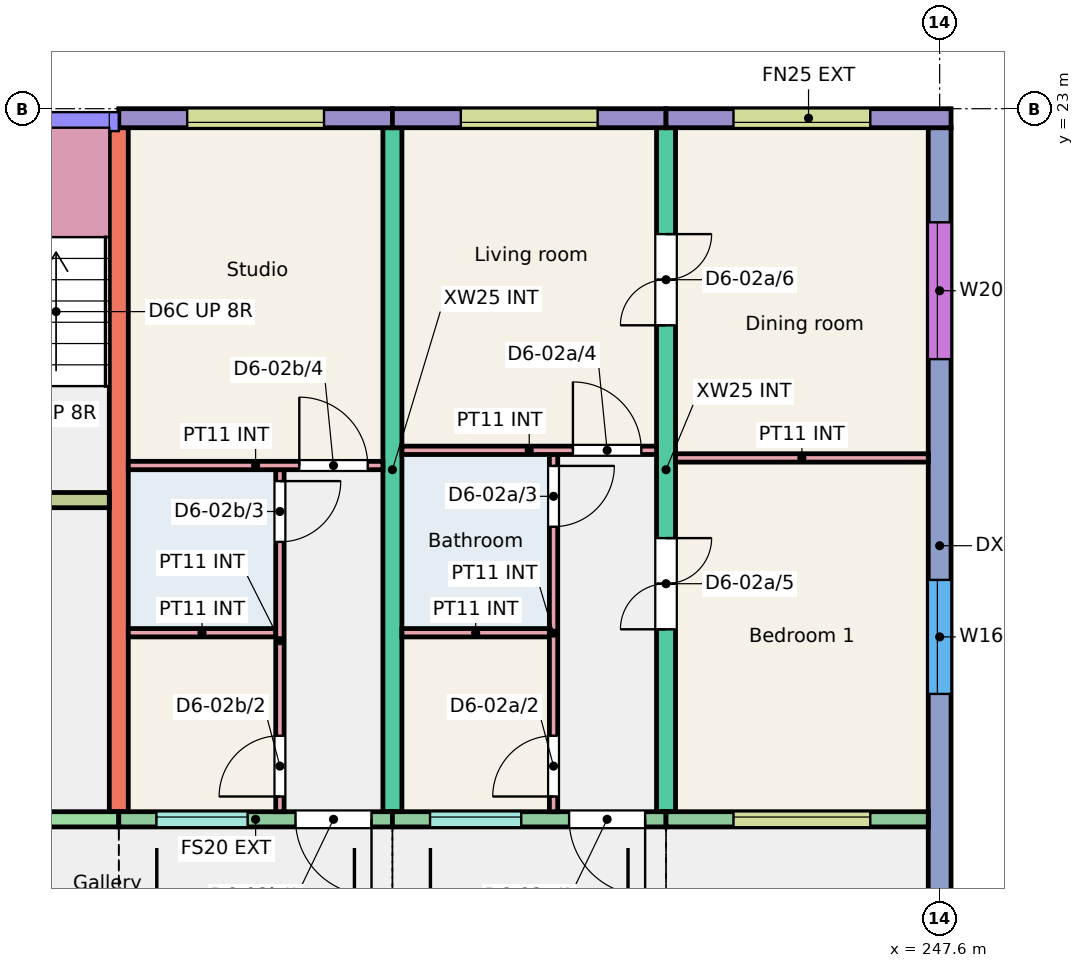
"""IFC4 building model, lengths in metres.
Left out: names, types, materials, properties, quantities, classifications, styles, units other than length and angle.
Written with IfcOpenShell. Run it as: python <this file> out.ifc"""

import sys

from ifc_helpers import new_model, si_unit, direction, frame, frame_2d, origin, place, context, subcontext, project, spatial, rectangle, extrude, element, fill, save


model = new_model("IFC4")
c1 = context("Model", 3, precision=1e-05, world=origin(), true_north=direction((0.0, 1.0)))
c2 = subcontext(c1, "Body", "Model", "MODEL_VIEW")
j1 = project(units=[si_unit("LENGTHUNIT", "METRE"), si_unit("PLANEANGLEUNIT", "RADIAN")], contexts=[c1])
p1 = place(None, origin())
s1 = spatial("IfcSite", under=j1, at=p1, CompositionType="ELEMENT")
p2 = place(p1, origin())
s2 = spatial("IfcBuilding", under=s1, at=p2, CompositionType="ELEMENT")
p3 = place(p2, frame((0.0, 0.0, 6.0)))
s3 = spatial("IfcBuildingStorey", under=s2, at=p3, CompositionType="ELEMENT", Elevation=6.0)
for number, where, z_axis, x_axis in (
    (1, (236.8, 13.75, 0.0), (0.0, 0.0, 1.0), (0.0, 1.0, 0.0)),
    (2, (240.4, 13.75, 0.0), (0.0, 0.0, 1.0), (0.0, 1.0, 0.0)),
):
    element("IfcWall", number, at=place(p3, frame(where, z_axis=z_axis, x_axis=x_axis)), inside=s3, PredefinedType="SHEAR", context=c2, shape_type="SweptSolid", body=[
        extrude(rectangle(XDim=9.0, YDim=0.25, at=frame_2d((4.5, 0.0))), origin(), (0.0, 0.0, 1.0), 3.0),
    ])
p4 = place(p3, frame((244.0, 13.75, 0.0), z_axis=(0.0, 0.0, 1.0), x_axis=(0.0, 1.0, 0.0)))
e3 = element("IfcWall", 3, at=p4, inside=s3, PredefinedType="SHEAR", context=c2, shape_type="SweptSolid", body=[
    extrude(rectangle(XDim=9.0, YDim=0.25, at=frame_2d((4.5, 0.0))), origin(), (0.0, 0.0, 1.0), 3.0),
])
p5 = place(p4, frame((2.4, 0.0, 0.0)))
e4 = element("IfcOpeningElement", 4, at=p5, cuts=e3, PredefinedType="OPENING", context=c2, shape_type="SweptSolid", body=[
    extrude(rectangle(XDim=1.2, YDim=2.1, at=frame_2d((0.6, 1.05))), frame((0.0, 0.135, 0.0), z_axis=(0.0, -1.0, 0.0), x_axis=(1.0, 0.0, 0.0)), (0.0, 0.0, 1.0), 0.27),
])
p6 = place(p4, frame((6.4, 0.0, 0.0)))
e5 = element("IfcOpeningElement", 5, at=p6, cuts=e3, PredefinedType="OPENING", context=c2, shape_type="SweptSolid", body=[
    extrude(rectangle(XDim=1.2, YDim=2.1, at=frame_2d((0.6, 1.05))), frame((0.0, 0.135, 0.0), z_axis=(0.0, -1.0, 0.0), x_axis=(1.0, 0.0, 0.0)), (0.0, 0.0, 1.0), 0.27),
])
p7 = place(p3, frame((247.6, 11.75, 0.0), z_axis=(0.0, 0.0, 1.0), x_axis=(0.0, 1.0, 0.0)))
e6 = element("IfcWall", 6, at=p7, inside=s3, PredefinedType="SHEAR", context=c2, shape_type="SweptSolid", body=[
    extrude(rectangle(XDim=11.0, YDim=0.3, at=frame_2d((5.5, 0.0))), origin(), (0.0, 0.0, 1.0), 3.0),
])
p8 = place(p7, frame((3.55, 0.0, 0.9)))
e7 = element("IfcOpeningElement", 7, at=p8, cuts=e6, PredefinedType="OPENING", context=c2, shape_type="SweptSolid", body=[
    extrude(rectangle(XDim=1.5, YDim=1.5, at=frame_2d((0.75, 0.75))), frame((0.0, 0.16, 0.0), z_axis=(0.0, -1.0, 0.0), x_axis=(1.0, 0.0, 0.0)), (0.0, 0.0, 1.0), 0.32),
])
p9 = place(p7, frame((7.955, 0.0, 0.9)))
e8 = element("IfcOpeningElement", 8, at=p9, cuts=e6, PredefinedType="OPENING", context=c2, shape_type="SweptSolid", body=[
    extrude(rectangle(XDim=1.8, YDim=1.5, at=frame_2d((0.9, 0.75))), frame((0.0, 0.16, 0.0), z_axis=(0.0, -1.0, 0.0), x_axis=(1.0, 0.0, 0.0)), (0.0, 0.0, 1.0), 0.32),
])
p10 = place(p3, frame((230.95, 13.65, 0.0), z_axis=(0.0, 0.0, 1.0), x_axis=(1.0, 0.0, 0.0)))
e9 = element("IfcWall", 9, at=p10, inside=s3, PredefinedType="SHEAR", context=c2, shape_type="SweptSolid", body=[
    extrude(rectangle(XDim=5.85, YDim=0.2, at=frame_2d((2.925, 0.0))), origin(), (0.0, 0.0, 1.0), 3.0),
])
p11 = place(p10, frame((2.312, 0.0, 0.0)))
e10 = element("IfcOpeningElement", 10, at=p11, cuts=e9, PredefinedType="OPENING", context=c2, shape_type="SweptSolid", body=[
    extrude(rectangle(XDim=1.1, YDim=2.1, at=frame_2d((0.55, 1.05))), frame((0.0, 0.11, 0.0), z_axis=(0.0, -1.0, 0.0), x_axis=(1.0, 0.0, 0.0)), (0.0, 0.0, 1.0), 0.22),
])
p12 = place(p3, frame((230.95, 17.85, 0.0), z_axis=(0.0, 0.0, 1.0), x_axis=(1.0, 0.0, 0.0)))
e11 = element("IfcWall", 11, at=p12, inside=s3, PredefinedType="SHEAR", context=c2, shape_type="SweptSolid", body=[
    extrude(rectangle(XDim=5.725, YDim=0.2, at=frame_2d((2.863, 0.0))), origin(), (0.0, 0.0, 1.0), 3.0),
])
p13 = place(p12, frame((3.775, 0.0, 0.0)))
e12 = element("IfcOpeningElement", 12, at=p13, cuts=e11, PredefinedType="OPENING", context=c2, shape_type="SweptSolid", body=[
    extrude(rectangle(XDim=1.0, YDim=2.1, at=frame_2d((0.5, 1.05))), frame((0.0, 0.11, 0.0), z_axis=(0.0, -1.0, 0.0), x_axis=(1.0, 0.0, 0.0)), (0.0, 0.0, 1.0), 0.22),
])
p14 = place(p12, frame((0.762, 0.0, 0.0)))
e13 = element("IfcOpeningElement", 13, at=p14, cuts=e11, PredefinedType="OPENING", context=c2, shape_type="SweptSolid", body=[
    extrude(rectangle(XDim=1.1, YDim=2.1, at=frame_2d((0.55, 1.05))), frame((0.0, 0.11, 0.0), z_axis=(0.0, -1.0, 0.0), x_axis=(1.0, 0.0, 0.0)), (0.0, 0.0, 1.0), 0.22),
])
p15 = place(p3, frame((236.8, 22.875, 0.0), z_axis=(0.0, 0.0, 1.0), x_axis=(1.0, 0.0, 0.0)))
e14 = element("IfcWall", 14, at=p15, inside=s3, PredefinedType="SOLIDWALL", context=c2, shape_type="SweptSolid", body=[
    extrude(rectangle(XDim=3.6, YDim=0.25, at=frame_2d((1.8, 0.0))), origin(), (0.0, 0.0, 1.0), 3.0),
])
p16 = place(p15, frame((0.9, 0.0, 1.1)))
e15 = element("IfcOpeningElement", 15, at=p16, cuts=e14, PredefinedType="OPENING", context=c2, shape_type="SweptSolid", body=[
    extrude(rectangle(XDim=1.8, YDim=1.3, at=frame_2d((0.9, 0.65))), frame((0.0, 0.135, 0.0), z_axis=(0.0, -1.0, 0.0), x_axis=(1.0, 0.0, 0.0)), (0.0, 0.0, 1.0), 0.27),
])
p17 = place(p3, frame((236.8, 13.65, 0.0), z_axis=(0.0, 0.0, 1.0), x_axis=(1.0, 0.0, 0.0)))
e16 = element("IfcWall", 16, at=p17, inside=s3, PredefinedType="SOLIDWALL", context=c2, shape_type="SweptSolid", body=[
    extrude(rectangle(XDim=3.6, YDim=0.2, at=frame_2d((1.8, 0.0))), origin(), (0.0, 0.0, 1.0), 3.0),
])
p18 = place(p17, frame((0.495, 0.0, 1.1)))
e17 = element("IfcOpeningElement", 17, at=p18, cuts=e16, PredefinedType="OPENING", context=c2, shape_type="SweptSolid", body=[
    extrude(rectangle(XDim=1.2, YDim=1.3, at=frame_2d((0.6, 0.65))), frame((0.0, 0.11, 0.0), z_axis=(0.0, -1.0, 0.0), x_axis=(1.0, 0.0, 0.0)), (0.0, 0.0, 1.0), 0.22),
])
p19 = place(p17, frame((2.325, 0.0, 0.0)))
e18 = element("IfcOpeningElement", 18, at=p19, cuts=e16, PredefinedType="OPENING", context=c2, shape_type="SweptSolid", body=[
    extrude(rectangle(XDim=1.0, YDim=2.1, at=frame_2d((0.5, 1.05))), frame((0.0, 0.11, 0.0), z_axis=(0.0, -1.0, 0.0), x_axis=(1.0, 0.0, 0.0)), (0.0, 0.0, 1.0), 0.22),
])
p20 = place(p3, frame((240.4, 22.875, 0.0), z_axis=(0.0, 0.0, 1.0), x_axis=(1.0, 0.0, 0.0)))
e19 = element("IfcWall", 19, at=p20, inside=s3, PredefinedType="SOLIDWALL", context=c2, shape_type="SweptSolid", body=[
    extrude(rectangle(XDim=3.6, YDim=0.25, at=frame_2d((1.8, 0.0))), origin(), (0.0, 0.0, 1.0), 3.0),
])
p21 = place(p20, frame((0.9, 0.0, 1.1)))
e20 = element("IfcOpeningElement", 20, at=p21, cuts=e19, PredefinedType="OPENING", context=c2, shape_type="SweptSolid", body=[
    extrude(rectangle(XDim=1.8, YDim=1.3, at=frame_2d((0.9, 0.65))), frame((0.0, 0.135, 0.0), z_axis=(0.0, -1.0, 0.0), x_axis=(1.0, 0.0, 0.0)), (0.0, 0.0, 1.0), 0.27),
])
p22 = place(p3, frame((240.4, 13.65, 0.0), z_axis=(0.0, 0.0, 1.0), x_axis=(1.0, 0.0, 0.0)))
e21 = element("IfcWall", 21, at=p22, inside=s3, PredefinedType="SOLIDWALL", context=c2, shape_type="SweptSolid", body=[
    extrude(rectangle(XDim=3.6, YDim=0.2, at=frame_2d((1.8, 0.0))), origin(), (0.0, 0.0, 1.0), 3.0),
])
p23 = place(p22, frame((0.495, 0.0, 1.1)))
e22 = element("IfcOpeningElement", 22, at=p23, cuts=e21, PredefinedType="OPENING", context=c2, shape_type="SweptSolid", body=[
    extrude(rectangle(XDim=1.2, YDim=1.3, at=frame_2d((0.6, 0.65))), frame((0.0, 0.11, 0.0), z_axis=(0.0, -1.0, 0.0), x_axis=(1.0, 0.0, 0.0)), (0.0, 0.0, 1.0), 0.22),
])
p24 = place(p22, frame((2.325, 0.0, 0.0)))
e23 = element("IfcOpeningElement", 23, at=p24, cuts=e21, PredefinedType="OPENING", context=c2, shape_type="SweptSolid", body=[
    extrude(rectangle(XDim=1.0, YDim=2.1, at=frame_2d((0.5, 1.05))), frame((0.0, 0.11, 0.0), z_axis=(0.0, -1.0, 0.0), x_axis=(1.0, 0.0, 0.0)), (0.0, 0.0, 1.0), 0.22),
])
p25 = place(p3, frame((244.0, 22.875, 0.0), z_axis=(0.0, 0.0, 1.0), x_axis=(1.0, 0.0, 0.0)))
e24 = element("IfcWall", 24, at=p25, inside=s3, PredefinedType="SOLIDWALL", context=c2, shape_type="SweptSolid", body=[
    extrude(rectangle(XDim=3.75, YDim=0.25, at=frame_2d((1.875, 0.0))), origin(), (0.0, 0.0, 1.0), 3.0),
])
p26 = place(p25, frame((0.887, 0.0, 1.1)))
e25 = element("IfcOpeningElement", 25, at=p26, cuts=e24, PredefinedType="OPENING", context=c2, shape_type="SweptSolid", body=[
    extrude(rectangle(XDim=1.8, YDim=1.3, at=frame_2d((0.9, 0.65))), frame((0.0, 0.135, 0.0), z_axis=(0.0, -1.0, 0.0), x_axis=(1.0, 0.0, 0.0)), (0.0, 0.0, 1.0), 0.27),
])
p27 = place(p3, frame((244.0, 13.65, 0.0), z_axis=(0.0, 0.0, 1.0), x_axis=(1.0, 0.0, 0.0)))
e26 = element("IfcWall", 26, at=p27, inside=s3, PredefinedType="SOLIDWALL", context=c2, shape_type="SweptSolid", body=[
    extrude(rectangle(XDim=3.45, YDim=0.2, at=frame_2d((1.725, 0.0))), origin(), (0.0, 0.0, 1.0), 3.0),
])
p28 = place(p27, frame((0.887, 0.0, 1.1)))
e27 = element("IfcOpeningElement", 27, at=p28, cuts=e26, PredefinedType="OPENING", context=c2, shape_type="SweptSolid", body=[
    extrude(rectangle(XDim=1.8, YDim=1.3, at=frame_2d((0.9, 0.65))), frame((0.0, 0.11, 0.0), z_axis=(0.0, -1.0, 0.0), x_axis=(1.0, 0.0, 0.0)), (0.0, 0.0, 1.0), 0.22),
])
p29 = place(p3, frame((240.525, 16.105, 0.0), z_axis=(0.0, 0.0, 1.0), x_axis=(1.0, 0.0, 0.0)))
e28 = element("IfcWall", 28, at=p29, inside=s3, PredefinedType="PARTITIONING", context=c2, shape_type="SweptSolid", body=[
    extrude(rectangle(XDim=1.94, YDim=0.11, at=frame_2d((0.97, 0.0))), origin(), (0.0, 0.0, 1.0), 2.8),
])
p30 = place(p3, frame((242.52, 13.75, 0.0), z_axis=(0.0, 0.0, 1.0), x_axis=(0.0, 1.0, 0.0)))
e29 = element("IfcWall", 29, at=p30, inside=s3, PredefinedType="PARTITIONING", context=c2, shape_type="SweptSolid", body=[
    extrude(rectangle(XDim=4.7, YDim=0.11, at=frame_2d((2.35, 0.0))), origin(), (0.0, 0.0, 1.0), 2.8),
])
p31 = place(p30, frame((0.2, 0.0, 0.0)))
e30 = element("IfcOpeningElement", 30, at=p31, cuts=e29, PredefinedType="OPENING", context=c2, shape_type="SweptSolid", body=[
    extrude(rectangle(XDim=0.8, YDim=2.1, at=frame_2d((0.4, 1.05))), frame((0.0, 0.065, 0.0), z_axis=(0.0, -1.0, 0.0), x_axis=(1.0, 0.0, 0.0)), (0.0, 0.0, 1.0), 0.13),
])
p32 = place(p30, frame((3.75, 0.0, 0.0)))
e31 = element("IfcOpeningElement", 31, at=p32, cuts=e29, PredefinedType="OPENING", context=c2, shape_type="SweptSolid", body=[
    extrude(rectangle(XDim=0.8, YDim=2.1, at=frame_2d((0.4, 1.05))), frame((0.0, 0.065, 0.0), z_axis=(0.0, -1.0, 0.0), x_axis=(1.0, 0.0, 0.0)), (0.0, 0.0, 1.0), 0.13),
])
p33 = place(p3, frame((240.525, 18.505, 0.0), z_axis=(0.0, 0.0, 1.0), x_axis=(1.0, 0.0, 0.0)))
e32 = element("IfcWall", 32, at=p33, inside=s3, PredefinedType="PARTITIONING", context=c2, shape_type="SweptSolid", body=[
    extrude(rectangle(XDim=3.35, YDim=0.11, at=frame_2d((1.675, 0.0))), origin(), (0.0, 0.0, 1.0), 2.8),
])
p34 = place(p33, frame((2.25, 0.0, 0.0)))
e33 = element("IfcOpeningElement", 33, at=p34, cuts=e32, PredefinedType="OPENING", context=c2, shape_type="SweptSolid", body=[
    extrude(rectangle(XDim=0.9, YDim=2.1, at=frame_2d((0.45, 1.05))), frame((0.0, 0.065, 0.0), z_axis=(0.0, -1.0, 0.0), x_axis=(1.0, 0.0, 0.0)), (0.0, 0.0, 1.0), 0.13),
])
p35 = place(p3, frame((244.125, 18.405, 0.0), z_axis=(0.0, 0.0, 1.0), x_axis=(1.0, 0.0, 0.0)))
e34 = element("IfcWall", 34, at=p35, inside=s3, PredefinedType="PARTITIONING", context=c2, shape_type="SweptSolid", body=[
    extrude(rectangle(XDim=3.325, YDim=0.11, at=frame_2d((1.663, 0.0))), origin(), (0.0, 0.0, 1.0), 2.8),
])
p36 = place(p3, frame((236.925, 16.105, 0.0), z_axis=(0.0, 0.0, 1.0), x_axis=(1.0, 0.0, 0.0)))
e35 = element("IfcWall", 35, at=p36, inside=s3, PredefinedType="PARTITIONING", context=c2, shape_type="SweptSolid", body=[
    extrude(rectangle(XDim=1.94, YDim=0.11, at=frame_2d((0.97, 0.0))), origin(), (0.0, 0.0, 1.0), 2.8),
])
p37 = place(p3, frame((238.92, 13.75, 0.0), z_axis=(0.0, 0.0, 1.0), x_axis=(0.0, 1.0, 0.0)))
e36 = element("IfcWall", 36, at=p37, inside=s3, PredefinedType="PARTITIONING", context=c2, shape_type="SweptSolid", body=[
    extrude(rectangle(XDim=4.5, YDim=0.11, at=frame_2d((2.25, 0.0))), origin(), (0.0, 0.0, 1.0), 2.8),
])
p38 = place(p37, frame((0.2, 0.0, 0.0)))
e37 = element("IfcOpeningElement", 37, at=p38, cuts=e36, PredefinedType="OPENING", context=c2, shape_type="SweptSolid", body=[
    extrude(rectangle(XDim=0.8, YDim=2.1, at=frame_2d((0.4, 1.05))), frame((0.0, 0.065, 0.0), z_axis=(0.0, -1.0, 0.0), x_axis=(1.0, 0.0, 0.0)), (0.0, 0.0, 1.0), 0.13),
])
p39 = place(p37, frame((3.55, 0.0, 0.0)))
e38 = element("IfcOpeningElement", 38, at=p39, cuts=e36, PredefinedType="OPENING", context=c2, shape_type="SweptSolid", body=[
    extrude(rectangle(XDim=0.8, YDim=2.1, at=frame_2d((0.4, 1.05))), frame((0.0, 0.065, 0.0), z_axis=(0.0, -1.0, 0.0), x_axis=(1.0, 0.0, 0.0)), (0.0, 0.0, 1.0), 0.13),
])
p40 = place(p3, frame((236.925, 18.305, 0.0), z_axis=(0.0, 0.0, 1.0), x_axis=(1.0, 0.0, 0.0)))
e39 = element("IfcWall", 39, at=p40, inside=s3, PredefinedType="PARTITIONING", context=c2, shape_type="SweptSolid", body=[
    extrude(rectangle(XDim=3.35, YDim=0.11, at=frame_2d((1.675, 0.0))), origin(), (0.0, 0.0, 1.0), 2.8),
])
p41 = place(p40, frame((2.25, 0.0, 0.0)))
e40 = element("IfcOpeningElement", 40, at=p41, cuts=e39, PredefinedType="OPENING", context=c2, shape_type="SweptSolid", body=[
    extrude(rectangle(XDim=0.9, YDim=2.1, at=frame_2d((0.45, 1.05))), frame((0.0, 0.065, 0.0), z_axis=(0.0, -1.0, 0.0), x_axis=(1.0, 0.0, 0.0)), (0.0, 0.0, 1.0), 0.13),
])
p42 = place(p28, origin())
e41 = element("IfcWindow", 41, at=p42, inside=s3, PartitioningType="SINGLE_PANEL", PredefinedType="WINDOW", context=c2, shape_type="SweptSolid", body=[
    extrude(rectangle(XDim=1.8, YDim=1.3, at=frame_2d((0.9, 0.65))), frame((0.0, 0.06, 0.0), z_axis=(0.0, -1.0, 0.0), x_axis=(1.0, 0.0, 0.0)), (0.0, 0.0, 1.0), 0.06),
])
fill(e27, e41)
p43 = place(p26, origin())
e42 = element("IfcWindow", 42, at=p43, inside=s3, PartitioningType="SINGLE_PANEL", PredefinedType="WINDOW", context=c2, shape_type="SweptSolid", body=[
    extrude(rectangle(XDim=1.8, YDim=1.3, at=frame_2d((0.9, 0.65))), frame((0.0, -0.025, 0.0), z_axis=(0.0, -1.0, 0.0), x_axis=(1.0, 0.0, 0.0)), (0.0, 0.0, 1.0), 0.06),
])
fill(e25, e42)
p44 = place(p23, origin())
e43 = element("IfcWindow", 43, at=p44, inside=s3, PartitioningType="SINGLE_PANEL", PredefinedType="WINDOW", context=c2, shape_type="SweptSolid", body=[
    extrude(rectangle(XDim=1.2, YDim=1.3, at=frame_2d((0.6, 0.65))), frame((0.0, 0.06, 0.0), z_axis=(0.0, -1.0, 0.0), x_axis=(1.0, 0.0, 0.0)), (0.0, 0.0, 1.0), 0.06),
])
fill(e22, e43)
p45 = place(p21, origin())
e44 = element("IfcWindow", 44, at=p45, inside=s3, PartitioningType="SINGLE_PANEL", PredefinedType="WINDOW", context=c2, shape_type="SweptSolid", body=[
    extrude(rectangle(XDim=1.8, YDim=1.3, at=frame_2d((0.9, 0.65))), frame((0.0, -0.025, 0.0), z_axis=(0.0, -1.0, 0.0), x_axis=(1.0, 0.0, 0.0)), (0.0, 0.0, 1.0), 0.06),
])
fill(e20, e44)
p46 = place(p8, origin())
e45 = element("IfcWindow", 45, at=p46, inside=s3, PartitioningType="SINGLE_PANEL", PredefinedType="WINDOW", context=c2, shape_type="SweptSolid", body=[
    extrude(rectangle(XDim=1.5, YDim=1.5, at=frame_2d((0.75, 0.75))), frame((0.0, 0.06, 0.0), z_axis=(0.0, -1.0, 0.0), x_axis=(1.0, 0.0, 0.0)), (0.0, 0.0, 1.0), 0.06),
])
fill(e7, e45)
p47 = place(p9, origin())
e46 = element("IfcWindow", 46, at=p47, inside=s3, PartitioningType="SINGLE_PANEL", PredefinedType="WINDOW", context=c2, shape_type="SweptSolid", body=[
    extrude(rectangle(XDim=1.8, YDim=1.5, at=frame_2d((0.9, 0.75))), frame((0.0, 0.06, 0.0), z_axis=(0.0, -1.0, 0.0), x_axis=(1.0, 0.0, 0.0)), (0.0, 0.0, 1.0), 0.06),
])
fill(e8, e46)
p48 = place(p18, origin())
e47 = element("IfcWindow", 47, at=p48, inside=s3, PartitioningType="SINGLE_PANEL", PredefinedType="WINDOW", context=c2, shape_type="SweptSolid", body=[
    extrude(rectangle(XDim=1.2, YDim=1.3, at=frame_2d((0.6, 0.65))), frame((0.0, 0.06, 0.0), z_axis=(0.0, -1.0, 0.0), x_axis=(1.0, 0.0, 0.0)), (0.0, 0.0, 1.0), 0.06),
])
fill(e17, e47)
p49 = place(p16, origin())
e48 = element("IfcWindow", 48, at=p49, inside=s3, PartitioningType="SINGLE_PANEL", PredefinedType="WINDOW", context=c2, shape_type="SweptSolid", body=[
    extrude(rectangle(XDim=1.8, YDim=1.3, at=frame_2d((0.9, 0.65))), frame((0.0, -0.025, 0.0), z_axis=(0.0, -1.0, 0.0), x_axis=(1.0, 0.0, 0.0)), (0.0, 0.0, 1.0), 0.06),
])
fill(e15, e48)
p50 = place(p24, origin())
e49 = element("IfcDoor", 49, at=p50, inside=s3, OperationType="SINGLE_SWING_RIGHT", PredefinedType="DOOR", context=c2, shape_type="SweptSolid", body=[
    extrude(rectangle(XDim=1.0, YDim=2.1, at=frame_2d((0.5, 1.05))), frame((0.0, 0.025, 0.0), z_axis=(0.0, -1.0, 0.0), x_axis=(1.0, 0.0, 0.0)), (0.0, 0.0, 1.0), 0.05),
])
fill(e23, e49)
p51 = place(p31, origin())
e50 = element("IfcDoor", 50, at=p51, inside=s3, OperationType="SINGLE_SWING_LEFT", PredefinedType="DOOR", context=c2, shape_type="SweptSolid", body=[
    extrude(rectangle(XDim=0.8, YDim=2.1, at=frame_2d((0.4, 1.05))), frame((0.0, 0.025, 0.0), z_axis=(0.0, -1.0, 0.0), x_axis=(1.0, 0.0, 0.0)), (0.0, 0.0, 1.0), 0.05),
])
fill(e30, e50)
p52 = place(p32, origin())
e51 = element("IfcDoor", 51, at=p52, inside=s3, OperationType="SINGLE_SWING_RIGHT", PredefinedType="DOOR", context=c2, shape_type="SweptSolid", body=[
    extrude(rectangle(XDim=0.8, YDim=2.1, at=frame_2d((0.4, 1.05))), frame((0.0, 0.025, 0.0), z_axis=(0.0, -1.0, 0.0), x_axis=(1.0, 0.0, 0.0)), (0.0, 0.0, 1.0), 0.05),
])
fill(e31, e51)
p53 = place(p34, origin())
e52 = element("IfcDoor", 52, at=p53, inside=s3, OperationType="SINGLE_SWING_LEFT", PredefinedType="DOOR", context=c2, shape_type="SweptSolid", body=[
    extrude(rectangle(XDim=0.9, YDim=2.1, at=frame_2d((0.45, 1.05))), frame((0.0, 0.025, 0.0), z_axis=(0.0, -1.0, 0.0), x_axis=(1.0, 0.0, 0.0)), (0.0, 0.0, 1.0), 0.05),
])
fill(e33, e52)
p54 = place(p5, origin())
e53 = element("IfcDoor", 53, at=p54, inside=s3, OperationType="DOUBLE_DOOR_SINGLE_SWING", PredefinedType="DOOR", context=c2, shape_type="SweptSolid", body=[
    extrude(rectangle(XDim=1.2, YDim=2.1, at=frame_2d((0.6, 1.05))), frame((0.0, 0.025, 0.0), z_axis=(0.0, -1.0, 0.0), x_axis=(1.0, 0.0, 0.0)), (0.0, 0.0, 1.0), 0.05),
])
fill(e4, e53)
p55 = place(p6, origin())
e54 = element("IfcDoor", 54, at=p55, inside=s3, OperationType="DOUBLE_DOOR_SINGLE_SWING", PredefinedType="DOOR", context=c2, shape_type="SweptSolid", body=[
    extrude(rectangle(XDim=1.2, YDim=2.1, at=frame_2d((0.6, 1.05))), frame((0.0, 0.025, 0.0), z_axis=(0.0, -1.0, 0.0), x_axis=(1.0, 0.0, 0.0)), (0.0, 0.0, 1.0), 0.05),
])
fill(e5, e54)
p56 = place(p19, origin())
e55 = element("IfcDoor", 55, at=p56, inside=s3, OperationType="SINGLE_SWING_RIGHT", PredefinedType="DOOR", context=c2, shape_type="SweptSolid", body=[
    extrude(rectangle(XDim=1.0, YDim=2.1, at=frame_2d((0.5, 1.05))), frame((0.0, 0.025, 0.0), z_axis=(0.0, -1.0, 0.0), x_axis=(1.0, 0.0, 0.0)), (0.0, 0.0, 1.0), 0.05),
])
fill(e18, e55)
p57 = place(p38, origin())
e56 = element("IfcDoor", 56, at=p57, inside=s3, OperationType="SINGLE_SWING_LEFT", PredefinedType="DOOR", context=c2, shape_type="SweptSolid", body=[
    extrude(rectangle(XDim=0.8, YDim=2.1, at=frame_2d((0.4, 1.05))), frame((0.0, 0.025, 0.0), z_axis=(0.0, -1.0, 0.0), x_axis=(1.0, 0.0, 0.0)), (0.0, 0.0, 1.0), 0.05),
])
fill(e37, e56)
p58 = place(p39, origin())
e57 = element("IfcDoor", 57, at=p58, inside=s3, OperationType="SINGLE_SWING_RIGHT", PredefinedType="DOOR", context=c2, shape_type="SweptSolid", body=[
    extrude(rectangle(XDim=0.8, YDim=2.1, at=frame_2d((0.4, 1.05))), frame((0.0, 0.025, 0.0), z_axis=(0.0, -1.0, 0.0), x_axis=(1.0, 0.0, 0.0)), (0.0, 0.0, 1.0), 0.05),
])
fill(e38, e57)
p59 = place(p41, origin())
e58 = element("IfcDoor", 58, at=p59, inside=s3, OperationType="SINGLE_SWING_LEFT", PredefinedType="DOOR", context=c2, shape_type="SweptSolid", body=[
    extrude(rectangle(XDim=0.9, YDim=2.1, at=frame_2d((0.45, 1.05))), frame((0.0, 0.025, 0.0), z_axis=(0.0, -1.0, 0.0), x_axis=(1.0, 0.0, 0.0)), (0.0, 0.0, 1.0), 0.05),
])
fill(e40, e58)
save(model, sys.argv[1])
